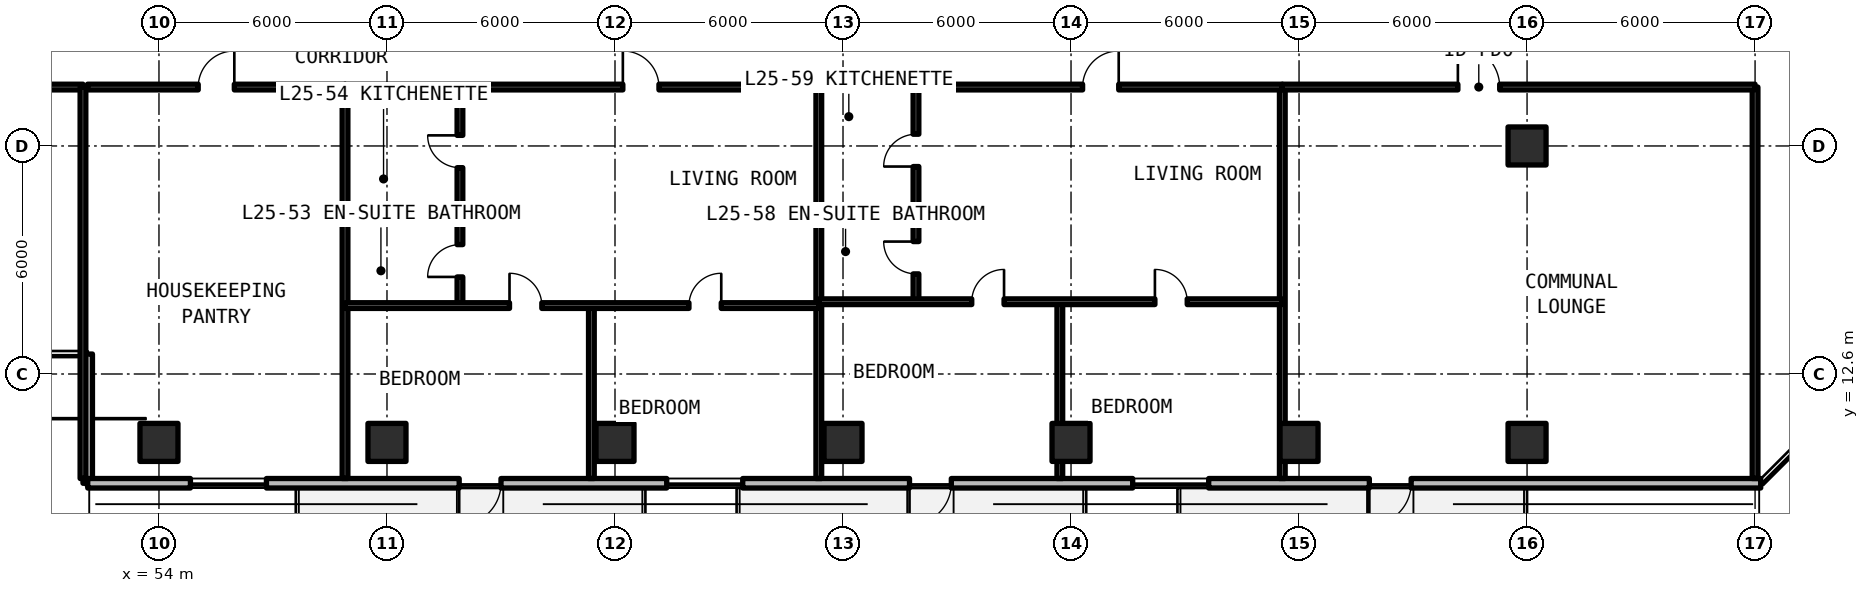
"""IFC4 building model, lengths in metres.
Left out: names, types, materials, properties, quantities, classifications, styles, units other than length and angle.
Written with IfcOpenShell. Run it as: python <this file> out.ifc"""

import sys

from ifc_helpers import new_model, si_unit, direction, frame, frame_2d, origin, origin_2d, place, context, subcontext, project, spatial, rectangle, extrude, element, fill, save


model = new_model("IFC4")
c1 = context("Model", 3, precision=1e-05, world=origin(), true_north=direction((0.0, 1.0)))
c2 = subcontext(c1, "Body", "Model", "MODEL_VIEW")
j1 = project(units=[si_unit("LENGTHUNIT", "METRE"), si_unit("PLANEANGLEUNIT", "RADIAN")], contexts=[c1])
p1 = place(None, origin())
s1 = spatial("IfcSite", under=j1, at=p1, CompositionType="ELEMENT")
p2 = place(p1, origin())
s2 = spatial("IfcBuilding", under=s1, at=p2, CompositionType="ELEMENT")
p3 = place(p2, frame((0.0, 0.0, 92.07)))
s3 = spatial("IfcBuildingStorey", under=s2, at=p3, CompositionType="ELEMENT", Elevation=92.07)
for number, where, z_axis, x_axis in (
    (1, (90.0, 18.6, 0.0), (0.0, 0.0, 1.0), (1.0, 0.0, 0.0)),
    (2, (54.0, 10.8, 0.0), (0.0, 0.0, 1.0), (1.0, 0.0, 0.0)),
    (3, (60.0, 10.8, 0.0), (0.0, 0.0, 1.0), (1.0, 0.0, 0.0)),
    (4, (66.0, 10.8, 0.0), (0.0, 0.0, 1.0), (1.0, 0.0, 0.0)),
    (5, (72.0, 10.8, 0.0), (0.0, 0.0, 1.0), (1.0, 0.0, 0.0)),
    (6, (78.0, 10.8, 0.0), (0.0, 0.0, 1.0), (1.0, 0.0, 0.0)),
    (7, (84.0, 10.8, 0.0), (0.0, 0.0, 1.0), (1.0, 0.0, 0.0)),
    (8, (90.0, 10.8, 0.0), (0.0, 0.0, 1.0), (1.0, 0.0, 0.0)),
):
    element("IfcColumn", number, at=place(p3, frame(where, z_axis=z_axis, x_axis=x_axis)), inside=s3, PredefinedType="COLUMN", context=c2, shape_type="SweptSolid", body=[
        extrude(rectangle(XDim=1.0, YDim=1.0, at=origin_2d()), origin(), (0.0, 0.0, 1.0), 3.3),
    ])
p4 = place(p3, frame((52.125, 13.125, 0.0), z_axis=(0.0, 0.0, 1.0), x_axis=(0.0, -1.0, 0.0)))
e9 = element("IfcWall", 9, at=p4, inside=s3, PredefinedType="SOLIDWALL", context=c2, shape_type="SweptSolid", body=[
    extrude(rectangle(XDim=3.4, YDim=0.25, at=frame_2d((1.7, 0.0))), origin(), (0.0, 0.0, 1.0), 3.08),
])
p5 = place(p3, frame((52.125, 9.725, 0.0), z_axis=(0.0, 0.0, 1.0), x_axis=(1.0, 0.0, 0.0)))
e10 = element("IfcWall", 10, at=p5, inside=s3, PredefinedType="SOLIDWALL", context=c2, shape_type="SweptSolid", body=[
    extrude(rectangle(XDim=44.023, YDim=0.25, at=frame_2d((22.012, 0.0))), origin(), (0.0, 0.0, 1.0), 3.08),
])
p6 = place(p5, frame((9.775, 0.0, 0.0)))
e11 = element("IfcOpeningElement", 11, at=p6, cuts=e10, PredefinedType="OPENING", context=c2, shape_type="SweptSolid", body=[
    extrude(rectangle(XDim=1.1, YDim=2.15, at=frame_2d((0.55, 1.075))), frame((0.0, 0.135, 0.0), z_axis=(0.0, -1.0, 0.0), x_axis=(1.0, 0.0, 0.0)), (0.0, 0.0, 1.0), 0.27),
])
p7 = place(p5, frame((21.625, 0.0, 0.0)))
e12 = element("IfcOpeningElement", 12, at=p7, cuts=e10, PredefinedType="OPENING", context=c2, shape_type="SweptSolid", body=[
    extrude(rectangle(XDim=1.1, YDim=2.15, at=frame_2d((0.55, 1.075))), frame((0.0, 0.135, 0.0), z_axis=(0.0, -1.0, 0.0), x_axis=(1.0, 0.0, 0.0)), (0.0, 0.0, 1.0), 0.27),
])
p8 = place(p5, frame((33.725, 0.0, 0.0)))
e13 = element("IfcOpeningElement", 13, at=p8, cuts=e10, PredefinedType="OPENING", context=c2, shape_type="SweptSolid", body=[
    extrude(rectangle(XDim=1.1, YDim=2.15, at=frame_2d((0.55, 1.075))), frame((0.0, 0.135, 0.0), z_axis=(0.0, -1.0, 0.0), x_axis=(1.0, 0.0, 0.0)), (0.0, 0.0, 1.0), 0.27),
])
p9 = place(p5, frame((2.703, 0.0, 0.78)))
e14 = element("IfcOpeningElement", 14, at=p9, cuts=e10, PredefinedType="OPENING", context=c2, shape_type="SweptSolid", body=[
    extrude(rectangle(XDim=2.0, YDim=1.66, at=frame_2d((1.0, 0.83))), frame((0.0, 0.135, 0.0), z_axis=(0.0, -1.0, 0.0), x_axis=(1.0, 0.0, 0.0)), (0.0, 0.0, 1.0), 0.27),
])
p10 = place(p5, frame((15.236, 0.0, 0.78)))
e15 = element("IfcOpeningElement", 15, at=p10, cuts=e10, PredefinedType="OPENING", context=c2, shape_type="SweptSolid", body=[
    extrude(rectangle(XDim=2.0, YDim=1.66, at=frame_2d((1.0, 0.83))), frame((0.0, 0.135, 0.0), z_axis=(0.0, -1.0, 0.0), x_axis=(1.0, 0.0, 0.0)), (0.0, 0.0, 1.0), 0.27),
])
p11 = place(p5, frame((27.498, 0.0, 0.78)))
e16 = element("IfcOpeningElement", 16, at=p11, cuts=e10, PredefinedType="OPENING", context=c2, shape_type="SweptSolid", body=[
    extrude(rectangle(XDim=2.0, YDim=1.66, at=frame_2d((1.0, 0.83))), frame((0.0, 0.135, 0.0), z_axis=(0.0, -1.0, 0.0), x_axis=(1.0, 0.0, 0.0)), (0.0, 0.0, 1.0), 0.27),
])
p12 = place(p3, frame((43.6, 20.15, 0.0), z_axis=(0.0, 0.0, 1.0), x_axis=(1.0, 0.0, 0.0)))
e17 = element("IfcWall", 17, at=p12, inside=s3, PredefinedType="SOLIDWALL", context=c2, shape_type="SweptSolid", body=[
    extrude(rectangle(XDim=8.4, YDim=0.15, at=frame_2d((4.2, 0.0))), origin(), (0.0, 0.0, 1.0), 2.35),
])
p13 = place(p12, frame((3.65, 0.0, 0.0)))
e18 = element("IfcOpeningElement", 18, at=p13, cuts=e17, PredefinedType="OPENING", context=c2, shape_type="SweptSolid", body=[
    extrude(rectangle(XDim=1.1, YDim=2.15, at=frame_2d((0.55, 1.075))), frame((0.0, 0.085, 0.0), z_axis=(0.0, -1.0, 0.0), x_axis=(1.0, 0.0, 0.0)), (0.0, 0.0, 1.0), 0.17),
])
for number, where, z_axis, x_axis in (
    (19, (52.0, 9.85, 0.0), (0.0, 0.0, 1.0), (0.0, 1.0, 0.0)),
    (20, (96.0, 9.85, 0.0), (0.0, 0.0, 1.0), (0.0, 1.0, 0.0)),
    (21, (58.896, 9.85, 0.0), (0.0, 0.0, 1.0), (0.0, 1.0, 0.0)),
):
    element("IfcWall", number, at=place(p3, frame(where, z_axis=z_axis, x_axis=x_axis)), inside=s3, PredefinedType="SOLIDWALL", context=c2, shape_type="SweptSolid", body=[
        extrude(rectangle(XDim=10.3, YDim=0.15, at=frame_2d((5.15, 0.0))), origin(), (0.0, 0.0, 1.0), 2.35),
    ])
p14 = place(p3, frame((52.12, 20.15, 0.0), z_axis=(0.0, 0.0, 1.0), x_axis=(1.0, 0.0, 0.0)))
e22 = element("IfcWall", 22, at=p14, inside=s3, PredefinedType="SOLIDWALL", context=c2, shape_type="SweptSolid", body=[
    extrude(rectangle(XDim=6.776, YDim=0.15, at=frame_2d((3.388, 0.0))), origin(), (0.0, 0.0, 1.0), 2.35),
])
p15 = place(p14, frame((2.913, 0.0, 0.0)))
e23 = element("IfcOpeningElement", 23, at=p15, cuts=e22, PredefinedType="OPENING", context=c2, shape_type="SweptSolid", body=[
    extrude(rectangle(XDim=0.95, YDim=2.15, at=frame_2d((0.475, 1.075))), frame((0.0, 0.085, 0.0), z_axis=(0.0, -1.0, 0.0), x_axis=(1.0, 0.0, 0.0)), (0.0, 0.0, 1.0), 0.17),
])
p16 = place(p3, frame((71.363, 9.85, 0.0), z_axis=(0.0, 0.0, 1.0), x_axis=(0.0, 1.0, 0.0)))
e24 = element("IfcWall", 24, at=p16, inside=s3, PredefinedType="SOLIDWALL", context=c2, shape_type="SweptSolid", body=[
    extrude(rectangle(XDim=10.3, YDim=0.15, at=frame_2d((5.15, 0.0))), origin(), (0.0, 0.0, 1.0), 2.35),
])
p17 = place(p3, frame((58.896, 16.758, 0.0), z_axis=(0.0, 0.0, 1.0), x_axis=(1.0, 0.0, 0.0)))
e25 = element("IfcWall", 25, at=p17, inside=s3, PredefinedType="PARTITIONING", context=c2, shape_type="SweptSolid", body=[
    extrude(rectangle(XDim=3.024, YDim=0.15, at=frame_2d((1.512, 0.0))), origin(), (0.0, 0.0, 1.0), 2.35),
])
p18 = place(p3, frame((61.92, 14.4, 0.0), z_axis=(0.0, 0.0, 1.0), x_axis=(0.0, 1.0, 0.0)))
e26 = element("IfcWall", 26, at=p18, inside=s3, PredefinedType="PARTITIONING", context=c2, shape_type="SweptSolid", body=[
    extrude(rectangle(XDim=5.75, YDim=0.15, at=frame_2d((2.875, 0.0))), origin(), (0.0, 0.0, 1.0), 2.35),
])
p19 = place(p18, frame((0.754, 0.0, 0.0)))
e27 = element("IfcOpeningElement", 27, at=p19, cuts=e26, PredefinedType="OPENING", context=c2, shape_type="SweptSolid", body=[
    extrude(rectangle(XDim=0.85, YDim=2.1, at=frame_2d((0.425, 1.05))), frame((0.0, 0.085, 0.0), z_axis=(0.0, -1.0, 0.0), x_axis=(1.0, 0.0, 0.0)), (0.0, 0.0, 1.0), 0.17),
])
p20 = place(p18, frame((3.628, 0.0, 0.0)))
e28 = element("IfcOpeningElement", 28, at=p20, cuts=e26, PredefinedType="OPENING", context=c2, shape_type="SweptSolid", body=[
    extrude(rectangle(XDim=0.85, YDim=2.1, at=frame_2d((0.425, 1.05))), frame((0.0, 0.085, 0.0), z_axis=(0.0, -1.0, 0.0), x_axis=(1.0, 0.0, 0.0)), (0.0, 0.0, 1.0), 0.17),
])
p21 = place(p3, frame((65.379, 9.85, 0.0), z_axis=(0.0, 0.0, 1.0), x_axis=(0.0, 1.0, 0.0)))
e29 = element("IfcWall", 29, at=p21, inside=s3, PredefinedType="PARTITIONING", context=c2, shape_type="SweptSolid", body=[
    extrude(rectangle(XDim=4.55, YDim=0.15, at=frame_2d((2.275, 0.0))), origin(), (0.0, 0.0, 1.0), 2.35),
])
p22 = place(p3, frame((58.896, 14.4, 0.0), z_axis=(0.0, 0.0, 1.0), x_axis=(1.0, 0.0, 0.0)))
e30 = element("IfcWall", 30, at=p22, inside=s3, PredefinedType="PARTITIONING", context=c2, shape_type="SweptSolid", body=[
    extrude(rectangle(XDim=12.468, YDim=0.15, at=frame_2d((6.234, 0.0))), origin(), (0.0, 0.0, 1.0), 2.35),
])
p23 = place(p22, frame((4.329, 0.0, 0.0)))
e31 = element("IfcOpeningElement", 31, at=p23, cuts=e30, PredefinedType="OPENING", context=c2, shape_type="SweptSolid", body=[
    extrude(rectangle(XDim=0.85, YDim=2.1, at=frame_2d((0.425, 1.05))), frame((0.0, 0.085, 0.0), z_axis=(0.0, -1.0, 0.0), x_axis=(1.0, 0.0, 0.0)), (0.0, 0.0, 1.0), 0.17),
])
p24 = place(p22, frame((9.05, 0.0, 0.0)))
e32 = element("IfcOpeningElement", 32, at=p24, cuts=e30, PredefinedType="OPENING", context=c2, shape_type="SweptSolid", body=[
    extrude(rectangle(XDim=0.85, YDim=2.1, at=frame_2d((0.425, 1.05))), frame((0.0, 0.085, 0.0), z_axis=(0.0, -1.0, 0.0), x_axis=(1.0, 0.0, 0.0)), (0.0, 0.0, 1.0), 0.17),
])
p25 = place(p3, frame((58.896, 20.15, 0.0), z_axis=(0.0, 0.0, 1.0), x_axis=(1.0, 0.0, 0.0)))
e33 = element("IfcWall", 33, at=p25, inside=s3, PredefinedType="SOLIDWALL", context=c2, shape_type="SweptSolid", body=[
    extrude(rectangle(XDim=12.468, YDim=0.15, at=frame_2d((6.234, 0.0))), origin(), (0.0, 0.0, 1.0), 2.35),
])
p26 = place(p25, frame((7.311, 0.0, 0.0)))
e34 = element("IfcOpeningElement", 34, at=p26, cuts=e33, PredefinedType="OPENING", context=c2, shape_type="SweptSolid", body=[
    extrude(rectangle(XDim=0.95, YDim=2.15, at=frame_2d((0.475, 1.075))), frame((0.0, 0.085, 0.0), z_axis=(0.0, -1.0, 0.0), x_axis=(1.0, 0.0, 0.0)), (0.0, 0.0, 1.0), 0.17),
])
p27 = place(p3, frame((83.56, 9.85, 0.0), z_axis=(0.0, 0.0, 1.0), x_axis=(0.0, 1.0, 0.0)))
e35 = element("IfcWall", 35, at=p27, inside=s3, PredefinedType="SOLIDWALL", context=c2, shape_type="SweptSolid", body=[
    extrude(rectangle(XDim=10.3, YDim=0.15, at=frame_2d((5.15, 0.0))), origin(), (0.0, 0.0, 1.0), 2.35),
])
p28 = place(p3, frame((71.363, 16.817, 0.0), z_axis=(0.0, 0.0, 1.0), x_axis=(1.0, 0.0, 0.0)))
e36 = element("IfcWall", 36, at=p28, inside=s3, PredefinedType="PARTITIONING", context=c2, shape_type="SweptSolid", body=[
    extrude(rectangle(XDim=2.557, YDim=0.15, at=frame_2d((1.278, 0.0))), origin(), (0.0, 0.0, 1.0), 2.35),
])
p29 = place(p3, frame((73.92, 14.501, 0.0), z_axis=(0.0, 0.0, 1.0), x_axis=(0.0, 1.0, 0.0)))
e37 = element("IfcWall", 37, at=p29, inside=s3, PredefinedType="PARTITIONING", context=c2, shape_type="SweptSolid", body=[
    extrude(rectangle(XDim=5.648, YDim=0.15, at=frame_2d((2.824, 0.0))), origin(), (0.0, 0.0, 1.0), 2.35),
])
p30 = place(p29, frame((0.733, 0.0, 0.0)))
e38 = element("IfcOpeningElement", 38, at=p30, cuts=e37, PredefinedType="OPENING", context=c2, shape_type="SweptSolid", body=[
    extrude(rectangle(XDim=0.85, YDim=2.1, at=frame_2d((0.425, 1.05))), frame((0.0, 0.085, 0.0), z_axis=(0.0, -1.0, 0.0), x_axis=(1.0, 0.0, 0.0)), (0.0, 0.0, 1.0), 0.17),
])
p31 = place(p29, frame((3.557, 0.0, 0.0)))
e39 = element("IfcOpeningElement", 39, at=p31, cuts=e37, PredefinedType="OPENING", context=c2, shape_type="SweptSolid", body=[
    extrude(rectangle(XDim=0.85, YDim=2.1, at=frame_2d((0.425, 1.05))), frame((0.0, 0.085, 0.0), z_axis=(0.0, -1.0, 0.0), x_axis=(1.0, 0.0, 0.0)), (0.0, 0.0, 1.0), 0.17),
])
p32 = place(p3, frame((77.705, 9.85, 0.0), z_axis=(0.0, 0.0, 1.0), x_axis=(0.0, 1.0, 0.0)))
e40 = element("IfcWall", 40, at=p32, inside=s3, PredefinedType="PARTITIONING", context=c2, shape_type="SweptSolid", body=[
    extrude(rectangle(XDim=4.651, YDim=0.15, at=frame_2d((2.326, 0.0))), origin(), (0.0, 0.0, 1.0), 2.35),
])
p33 = place(p3, frame((71.363, 14.501, 0.0), z_axis=(0.0, 0.0, 1.0), x_axis=(1.0, 0.0, 0.0)))
e41 = element("IfcWall", 41, at=p33, inside=s3, PredefinedType="PARTITIONING", context=c2, shape_type="SweptSolid", body=[
    extrude(rectangle(XDim=12.196, YDim=0.15, at=frame_2d((6.098, 0.0))), origin(), (0.0, 0.0, 1.0), 2.35),
])
p34 = place(p33, frame((4.024, 0.0, 0.0)))
e42 = element("IfcOpeningElement", 42, at=p34, cuts=e41, PredefinedType="OPENING", context=c2, shape_type="SweptSolid", body=[
    extrude(rectangle(XDim=0.85, YDim=2.1, at=frame_2d((0.425, 1.05))), frame((0.0, 0.085, 0.0), z_axis=(0.0, -1.0, 0.0), x_axis=(1.0, 0.0, 0.0)), (0.0, 0.0, 1.0), 0.17),
])
p35 = place(p33, frame((8.844, 0.0, 0.0)))
e43 = element("IfcOpeningElement", 43, at=p35, cuts=e41, PredefinedType="OPENING", context=c2, shape_type="SweptSolid", body=[
    extrude(rectangle(XDim=0.85, YDim=2.1, at=frame_2d((0.425, 1.05))), frame((0.0, 0.085, 0.0), z_axis=(0.0, -1.0, 0.0), x_axis=(1.0, 0.0, 0.0)), (0.0, 0.0, 1.0), 0.17),
])
p36 = place(p3, frame((71.363, 20.15, 0.0), z_axis=(0.0, 0.0, 1.0), x_axis=(1.0, 0.0, 0.0)))
e44 = element("IfcWall", 44, at=p36, inside=s3, PredefinedType="SOLIDWALL", context=c2, shape_type="SweptSolid", body=[
    extrude(rectangle(XDim=12.196, YDim=0.15, at=frame_2d((6.098, 0.0))), origin(), (0.0, 0.0, 1.0), 2.35),
])
p37 = place(p36, frame((6.942, 0.0, 0.0)))
e45 = element("IfcOpeningElement", 45, at=p37, cuts=e44, PredefinedType="OPENING", context=c2, shape_type="SweptSolid", body=[
    extrude(rectangle(XDim=0.95, YDim=2.15, at=frame_2d((0.475, 1.075))), frame((0.0, 0.085, 0.0), z_axis=(0.0, -1.0, 0.0), x_axis=(1.0, 0.0, 0.0)), (0.0, 0.0, 1.0), 0.17),
])
p38 = place(p3, frame((83.56, 20.15, 0.0), z_axis=(0.0, 0.0, 1.0), x_axis=(1.0, 0.0, 0.0)))
e46 = element("IfcWall", 46, at=p38, inside=s3, PredefinedType="SOLIDWALL", context=c2, shape_type="SweptSolid", body=[
    extrude(rectangle(XDim=12.44, YDim=0.15, at=frame_2d((6.22, 0.0))), origin(), (0.0, 0.0, 1.0), 2.35),
])
p39 = place(p38, frame((4.62, 0.0, 0.0)))
e47 = element("IfcOpeningElement", 47, at=p39, cuts=e46, PredefinedType="OPENING", context=c2, shape_type="SweptSolid", body=[
    extrude(rectangle(XDim=1.1, YDim=2.15, at=frame_2d((0.55, 1.075))), frame((0.0, 0.085, 0.0), z_axis=(0.0, -1.0, 0.0), x_axis=(1.0, 0.0, 0.0)), (0.0, 0.0, 1.0), 0.17),
])
p40 = place(p6, frame((1.1, 0.0, 0.0), z_axis=(0.0, 0.0, 1.0), x_axis=(-1.0, 0.0, 0.0)))
e48 = element("IfcDoor", 48, at=p40, inside=s3, OperationType="SINGLE_SWING_LEFT", PredefinedType="DOOR", context=c2, shape_type="SweptSolid", body=[
    extrude(rectangle(XDim=1.1, YDim=2.15, at=frame_2d((0.55, 1.075))), frame((0.0, 0.025, 0.0), z_axis=(0.0, -1.0, 0.0), x_axis=(1.0, 0.0, 0.0)), (0.0, 0.0, 1.0), 0.05),
])
fill(e11, e48)
p41 = place(p7, frame((1.1, 0.0, 0.0), z_axis=(0.0, 0.0, 1.0), x_axis=(-1.0, 0.0, 0.0)))
e49 = element("IfcDoor", 49, at=p41, inside=s3, OperationType="SINGLE_SWING_RIGHT", PredefinedType="DOOR", context=c2, shape_type="SweptSolid", body=[
    extrude(rectangle(XDim=1.1, YDim=2.15, at=frame_2d((0.55, 1.075))), frame((0.0, 0.025, 0.0), z_axis=(0.0, -1.0, 0.0), x_axis=(1.0, 0.0, 0.0)), (0.0, 0.0, 1.0), 0.05),
])
fill(e12, e49)
p42 = place(p8, frame((1.1, 0.0, 0.0), z_axis=(0.0, 0.0, 1.0), x_axis=(-1.0, 0.0, 0.0)))
e50 = element("IfcDoor", 50, at=p42, inside=s3, OperationType="SINGLE_SWING_LEFT", PredefinedType="DOOR", context=c2, shape_type="SweptSolid", body=[
    extrude(rectangle(XDim=1.1, YDim=2.15, at=frame_2d((0.55, 1.075))), frame((0.0, 0.025, 0.0), z_axis=(0.0, -1.0, 0.0), x_axis=(1.0, 0.0, 0.0)), (0.0, 0.0, 1.0), 0.05),
])
fill(e13, e50)
p43 = place(p9, origin())
e51 = element("IfcWindow", 51, at=p43, inside=s3, PartitioningType="SINGLE_PANEL", PredefinedType="WINDOW", context=c2, shape_type="SweptSolid", body=[
    extrude(rectangle(XDim=2.0, YDim=1.66, at=frame_2d((1.0, 0.83))), frame((0.0, 0.03, 0.0), z_axis=(0.0, -1.0, 0.0), x_axis=(1.0, 0.0, 0.0)), (0.0, 0.0, 1.0), 0.06),
])
fill(e14, e51)
p44 = place(p10, origin())
e52 = element("IfcWindow", 52, at=p44, inside=s3, PartitioningType="SINGLE_PANEL", PredefinedType="WINDOW", context=c2, shape_type="SweptSolid", body=[
    extrude(rectangle(XDim=2.0, YDim=1.66, at=frame_2d((1.0, 0.83))), frame((0.0, 0.03, 0.0), z_axis=(0.0, -1.0, 0.0), x_axis=(1.0, 0.0, 0.0)), (0.0, 0.0, 1.0), 0.06),
])
fill(e15, e52)
p45 = place(p11, origin())
e53 = element("IfcWindow", 53, at=p45, inside=s3, PartitioningType="SINGLE_PANEL", PredefinedType="WINDOW", context=c2, shape_type="SweptSolid", body=[
    extrude(rectangle(XDim=2.0, YDim=1.66, at=frame_2d((1.0, 0.83))), frame((0.0, 0.03, 0.0), z_axis=(0.0, -1.0, 0.0), x_axis=(1.0, 0.0, 0.0)), (0.0, 0.0, 1.0), 0.06),
])
fill(e16, e53)
p46 = place(p15, origin())
e54 = element("IfcDoor", 54, at=p46, inside=s3, OperationType="SINGLE_SWING_RIGHT", PredefinedType="DOOR", context=c2, shape_type="SweptSolid", body=[
    extrude(rectangle(XDim=0.95, YDim=2.15, at=frame_2d((0.475, 1.075))), frame((0.0, 0.025, 0.0), z_axis=(0.0, -1.0, 0.0), x_axis=(1.0, 0.0, 0.0)), (0.0, 0.0, 1.0), 0.05),
])
fill(e23, e54)
p47 = place(p19, origin())
e55 = element("IfcDoor", 55, at=p47, inside=s3, OperationType="SINGLE_SWING_LEFT", PredefinedType="DOOR", context=c2, shape_type="SweptSolid", body=[
    extrude(rectangle(XDim=0.85, YDim=2.1, at=frame_2d((0.425, 1.05))), frame((0.0, 0.025, 0.0), z_axis=(0.0, -1.0, 0.0), x_axis=(1.0, 0.0, 0.0)), (0.0, 0.0, 1.0), 0.05),
])
fill(e27, e55)
p48 = place(p20, origin())
e56 = element("IfcDoor", 56, at=p48, inside=s3, OperationType="SINGLE_SWING_RIGHT", PredefinedType="DOOR", context=c2, shape_type="SweptSolid", body=[
    extrude(rectangle(XDim=0.85, YDim=2.1, at=frame_2d((0.425, 1.05))), frame((0.0, 0.025, 0.0), z_axis=(0.0, -1.0, 0.0), x_axis=(1.0, 0.0, 0.0)), (0.0, 0.0, 1.0), 0.05),
])
fill(e28, e56)
p49 = place(p23, origin())
e57 = element("IfcDoor", 57, at=p49, inside=s3, OperationType="SINGLE_SWING_LEFT", PredefinedType="DOOR", context=c2, shape_type="SweptSolid", body=[
    extrude(rectangle(XDim=0.85, YDim=2.1, at=frame_2d((0.425, 1.05))), frame((0.0, 0.025, 0.0), z_axis=(0.0, -1.0, 0.0), x_axis=(1.0, 0.0, 0.0)), (0.0, 0.0, 1.0), 0.05),
])
fill(e31, e57)
p50 = place(p24, origin())
e58 = element("IfcDoor", 58, at=p50, inside=s3, OperationType="SINGLE_SWING_RIGHT", PredefinedType="DOOR", context=c2, shape_type="SweptSolid", body=[
    extrude(rectangle(XDim=0.85, YDim=2.1, at=frame_2d((0.425, 1.05))), frame((0.0, 0.025, 0.0), z_axis=(0.0, -1.0, 0.0), x_axis=(1.0, 0.0, 0.0)), (0.0, 0.0, 1.0), 0.05),
])
fill(e32, e58)
p51 = place(p26, origin())
e59 = element("IfcDoor", 59, at=p51, inside=s3, OperationType="SINGLE_SWING_LEFT", PredefinedType="DOOR", context=c2, shape_type="SweptSolid", body=[
    extrude(rectangle(XDim=0.95, YDim=2.15, at=frame_2d((0.475, 1.075))), frame((0.0, 0.025, 0.0), z_axis=(0.0, -1.0, 0.0), x_axis=(1.0, 0.0, 0.0)), (0.0, 0.0, 1.0), 0.05),
])
fill(e34, e59)
p52 = place(p30, origin())
e60 = element("IfcDoor", 60, at=p52, inside=s3, OperationType="SINGLE_SWING_RIGHT", PredefinedType="DOOR", context=c2, shape_type="SweptSolid", body=[
    extrude(rectangle(XDim=0.85, YDim=2.1, at=frame_2d((0.425, 1.05))), frame((0.0, 0.025, 0.0), z_axis=(0.0, -1.0, 0.0), x_axis=(1.0, 0.0, 0.0)), (0.0, 0.0, 1.0), 0.05),
])
fill(e38, e60)
p53 = place(p31, origin())
e61 = element("IfcDoor", 61, at=p53, inside=s3, OperationType="SINGLE_SWING_LEFT", PredefinedType="DOOR", context=c2, shape_type="SweptSolid", body=[
    extrude(rectangle(XDim=0.85, YDim=2.1, at=frame_2d((0.425, 1.05))), frame((0.0, 0.025, 0.0), z_axis=(0.0, -1.0, 0.0), x_axis=(1.0, 0.0, 0.0)), (0.0, 0.0, 1.0), 0.05),
])
fill(e39, e61)
p54 = place(p34, origin())
e62 = element("IfcDoor", 62, at=p54, inside=s3, OperationType="SINGLE_SWING_RIGHT", PredefinedType="DOOR", context=c2, shape_type="SweptSolid", body=[
    extrude(rectangle(XDim=0.85, YDim=2.1, at=frame_2d((0.425, 1.05))), frame((0.0, 0.025, 0.0), z_axis=(0.0, -1.0, 0.0), x_axis=(1.0, 0.0, 0.0)), (0.0, 0.0, 1.0), 0.05),
])
fill(e42, e62)
p55 = place(p35, origin())
e63 = element("IfcDoor", 63, at=p55, inside=s3, OperationType="SINGLE_SWING_LEFT", PredefinedType="DOOR", context=c2, shape_type="SweptSolid", body=[
    extrude(rectangle(XDim=0.85, YDim=2.1, at=frame_2d((0.425, 1.05))), frame((0.0, 0.025, 0.0), z_axis=(0.0, -1.0, 0.0), x_axis=(1.0, 0.0, 0.0)), (0.0, 0.0, 1.0), 0.05),
])
fill(e43, e63)
p56 = place(p37, origin())
e64 = element("IfcDoor", 64, at=p56, inside=s3, OperationType="SINGLE_SWING_RIGHT", PredefinedType="DOOR", context=c2, shape_type="SweptSolid", body=[
    extrude(rectangle(XDim=0.95, YDim=2.15, at=frame_2d((0.475, 1.075))), frame((0.0, 0.025, 0.0), z_axis=(0.0, -1.0, 0.0), x_axis=(1.0, 0.0, 0.0)), (0.0, 0.0, 1.0), 0.05),
])
fill(e45, e64)
p57 = place(p39, origin())
e65 = element("IfcDoor", 65, at=p57, inside=s3, OperationType="SINGLE_SWING_LEFT", PredefinedType="DOOR", context=c2, shape_type="SweptSolid", body=[
    extrude(rectangle(XDim=1.1, YDim=2.15, at=frame_2d((0.55, 1.075))), frame((0.0, 0.025, 0.0), z_axis=(0.0, -1.0, 0.0), x_axis=(1.0, 0.0, 0.0)), (0.0, 0.0, 1.0), 0.05),
])
fill(e47, e65)
save(model, sys.argv[1])
